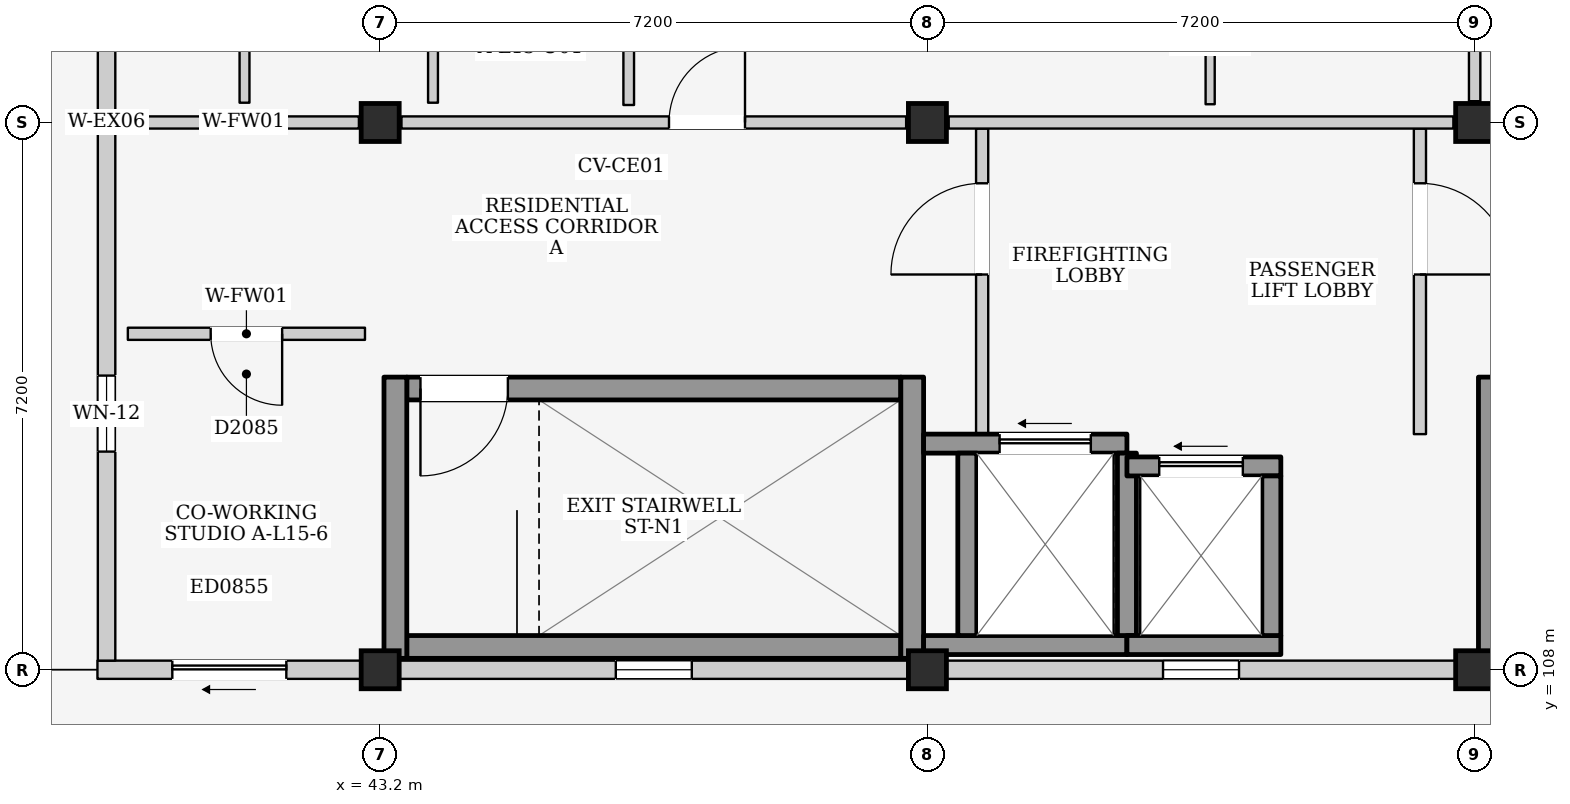
"""IFC4 building model, lengths in metres.
Left out: names, types, materials, properties, quantities, classifications, styles, units other than length and angle.
Written with IfcOpenShell. Run it as: python <this file> out.ifc"""

import sys

from ifc_helpers import new_model, si_unit, direction, frame, frame_2d, origin, origin_2d, place, context, subcontext, project, spatial, rectangle, extrude, element, fill, save


model = new_model("IFC4")
c1 = context("Model", 3, precision=1e-05, world=origin(), true_north=direction((0.0, 1.0)))
c2 = subcontext(c1, "Body", "Model", "MODEL_VIEW")
j1 = project(units=[si_unit("LENGTHUNIT", "METRE"), si_unit("PLANEANGLEUNIT", "RADIAN")], contexts=[c1])
p1 = place(None, origin())
s1 = spatial("IfcSite", under=j1, at=p1, CompositionType="ELEMENT")
p2 = place(p1, origin())
s2 = spatial("IfcBuilding", under=s1, at=p2, CompositionType="ELEMENT")
p3 = place(p2, frame((0.0, 0.0, 50.9)))
s3 = spatial("IfcBuildingStorey", under=s2, at=p3, CompositionType="ELEMENT", Elevation=50.9)
for number, where, z_axis, x_axis in (
    (1, (43.2, 108.0, 0.0), (0.0, 0.0, 1.0), (1.0, 0.0, 0.0)),
    (2, (43.2, 115.2, 0.0), (0.0, 0.0, 1.0), (1.0, 0.0, 0.0)),
    (3, (50.4, 108.0, 0.0), (0.0, 0.0, 1.0), (1.0, 0.0, 0.0)),
    (4, (50.4, 115.2, 0.0), (0.0, 0.0, 1.0), (1.0, 0.0, 0.0)),
    (5, (57.6, 108.0, 0.0), (0.0, 0.0, 1.0), (1.0, 0.0, 0.0)),
    (6, (57.6, 115.2, 0.0), (0.0, 0.0, 1.0), (1.0, 0.0, 0.0)),
):
    element("IfcColumn", number, at=place(p3, frame(where, z_axis=z_axis, x_axis=x_axis)), inside=s3, PredefinedType="COLUMN", context=c2, shape_type="SweptSolid", body=[
        extrude(rectangle(XDim=0.5, YDim=0.5, at=origin_2d()), origin(), (0.0, 0.0, 1.0), 3.2),
    ])
p4 = place(p3, frame((39.48, 108.0, 0.0), z_axis=(0.0, 0.0, 1.0), x_axis=(1.0, 0.0, 0.0)))
e7 = element("IfcWall", 7, at=p4, inside=s3, PredefinedType="ELEMENTEDWALL", context=c2, shape_type="SweptSolid", body=[
    extrude(rectangle(XDim=3.47, YDim=0.24, at=frame_2d((1.735, 0.0))), origin(), (0.0, 0.0, 1.0), 2.295),
])
p5 = place(p4, frame((0.985, 0.0, 0.0)))
e8 = element("IfcOpeningElement", 8, at=p5, cuts=e7, PredefinedType="OPENING", context=c2, shape_type="SweptSolid", body=[
    extrude(rectangle(XDim=1.5, YDim=2.12, at=frame_2d((0.75, 1.06))), frame((0.0, 0.135, 0.0), z_axis=(0.0, -1.0, 0.0), x_axis=(1.0, 0.0, 0.0)), (0.0, 0.0, 1.0), 0.27),
])
p6 = place(p3, frame((43.45, 108.0, 0.0), z_axis=(0.0, 0.0, 1.0), x_axis=(1.0, 0.0, 0.0)))
e9 = element("IfcWall", 9, at=p6, inside=s3, PredefinedType="ELEMENTEDWALL", context=c2, shape_type="SweptSolid", body=[
    extrude(rectangle(XDim=6.7, YDim=0.24, at=frame_2d((3.35, 0.0))), origin(), (0.0, 0.0, 1.0), 2.295),
])
p7 = place(p6, frame((2.85, 0.0, 1.2)))
e10 = element("IfcOpeningElement", 10, at=p7, cuts=e9, PredefinedType="OPENING", context=c2, shape_type="SweptSolid", body=[
    extrude(rectangle(XDim=1.0, YDim=0.9, at=frame_2d((0.5, 0.45))), frame((0.0, 0.135, 0.0), z_axis=(0.0, -1.0, 0.0), x_axis=(1.0, 0.0, 0.0)), (0.0, 0.0, 1.0), 0.27),
])
p8 = place(p3, frame((50.65, 108.0, 0.0), z_axis=(0.0, 0.0, 1.0), x_axis=(1.0, 0.0, 0.0)))
e11 = element("IfcWall", 11, at=p8, inside=s3, PredefinedType="ELEMENTEDWALL", context=c2, shape_type="SweptSolid", body=[
    extrude(rectangle(XDim=6.7, YDim=0.24, at=frame_2d((3.35, 0.0))), origin(), (0.0, 0.0, 1.0), 2.295),
])
p9 = place(p8, frame((2.85, 0.0, 1.2)))
e12 = element("IfcOpeningElement", 12, at=p9, cuts=e11, PredefinedType="OPENING", context=c2, shape_type="SweptSolid", body=[
    extrude(rectangle(XDim=1.0, YDim=0.9, at=frame_2d((0.5, 0.45))), frame((0.0, 0.135, 0.0), z_axis=(0.0, -1.0, 0.0), x_axis=(1.0, 0.0, 0.0)), (0.0, 0.0, 1.0), 0.27),
])
p10 = place(p3, frame((39.6, 108.12, 0.0), z_axis=(0.0, 0.0, 1.0), x_axis=(0.0, 1.0, 0.0)))
e13 = element("IfcWall", 13, at=p10, inside=s3, PredefinedType="ELEMENTEDWALL", context=c2, shape_type="SweptSolid", body=[
    extrude(rectangle(XDim=7.08, YDim=0.23, at=frame_2d((3.54, 0.0))), origin(), (0.0, 0.0, 1.0), 2.395),
])
p11 = place(p10, frame((2.75, 0.0, 1.1)))
e14 = element("IfcOpeningElement", 14, at=p11, cuts=e13, PredefinedType="OPENING", context=c2, shape_type="SweptSolid", body=[
    extrude(rectangle(XDim=1.0, YDim=0.9, at=frame_2d((0.5, 0.45))), frame((0.0, 0.13, 0.0), z_axis=(0.0, -1.0, 0.0), x_axis=(1.0, 0.0, 0.0)), (0.0, 0.0, 1.0), 0.26),
])
p12 = place(p3, frame((39.6, 115.2, 0.0), z_axis=(0.0, 0.0, 1.0), x_axis=(0.0, 1.0, 0.0)))
e15 = element("IfcWall", 15, at=p12, inside=s3, PredefinedType="ELEMENTEDWALL", context=c2, shape_type="SweptSolid", body=[
    extrude(rectangle(XDim=7.08, YDim=0.23, at=frame_2d((3.54, 0.0))), origin(), (0.0, 0.0, 1.0), 2.395),
])
p13 = place(p12, frame((3.6, 0.0, 0.0)))
e16 = element("IfcOpeningElement", 16, at=p13, cuts=e15, PredefinedType="OPENING", context=c2, shape_type="SweptSolid", body=[
    extrude(rectangle(XDim=1.08, YDim=2.12, at=frame_2d((0.54, 1.06))), frame((0.0, 0.13, 0.0), z_axis=(0.0, -1.0, 0.0), x_axis=(1.0, 0.0, 0.0)), (0.0, 0.0, 1.0), 0.26),
])
p14 = place(p3, frame((43.55, 108.3, 0.0), z_axis=(0.0, 0.0, 1.0), x_axis=(1.0, 0.0, 0.0)))
e17 = element("IfcWall", 17, at=p14, inside=s3, PredefinedType="SHEAR", context=c2, shape_type="SweptSolid", body=[
    extrude(rectangle(XDim=6.5, YDim=0.3, at=frame_2d((3.25, 0.0))), origin(), (0.0, 0.0, 1.0), 2.96),
])
p15 = place(p3, frame((43.55, 111.7, 0.0), z_axis=(0.0, 0.0, 1.0), x_axis=(1.0, 0.0, 0.0)))
e18 = element("IfcWall", 18, at=p15, inside=s3, PredefinedType="SHEAR", context=c2, shape_type="SweptSolid", body=[
    extrude(rectangle(XDim=6.5, YDim=0.3, at=frame_2d((3.25, 0.0))), origin(), (0.0, 0.0, 1.0), 2.96),
])
p16 = place(p15, frame((0.18, 0.0, 0.0)))
e19 = element("IfcOpeningElement", 19, at=p16, cuts=e18, PredefinedType="OPENING", context=c2, shape_type="SweptSolid", body=[
    extrude(rectangle(XDim=1.15, YDim=2.2, at=frame_2d((0.575, 1.1))), frame((0.0, 0.165, 0.0), z_axis=(0.0, -1.0, 0.0), x_axis=(1.0, 0.0, 0.0)), (0.0, 0.0, 1.0), 0.33),
])
for number, where, z_axis, x_axis in (
    (20, (43.4, 108.15, 0.0), (0.0, 0.0, 1.0), (0.0, 1.0, 0.0)),
    (21, (50.2, 108.15, 0.0), (0.0, 0.0, 1.0), (0.0, 1.0, 0.0)),
):
    element("IfcWall", number, at=place(p3, frame(where, z_axis=z_axis, x_axis=x_axis)), inside=s3, PredefinedType="SHEAR", context=c2, shape_type="SweptSolid", body=[
        extrude(rectangle(XDim=3.7, YDim=0.3, at=frame_2d((1.85, 0.0))), origin(), (0.0, 0.0, 1.0), 2.96),
    ])
p17 = place(p3, frame((51.12, 111.1, 0.0), z_axis=(0.0, 0.0, 1.0), x_axis=(0.0, 1.0, 0.0)))
e22 = element("IfcWall", 22, at=p17, inside=s3, PredefinedType="PARTITIONING", context=c2, shape_type="SweptSolid", body=[
    extrude(rectangle(XDim=4.02, YDim=0.16, at=frame_2d((2.01, 0.0))), origin(), (0.0, 0.0, 1.0), 2.96),
])
p18 = place(p17, frame((2.1, 0.0, 0.0)))
e23 = element("IfcOpeningElement", 23, at=p18, cuts=e22, PredefinedType="OPENING", context=c2, shape_type="SweptSolid", body=[
    extrude(rectangle(XDim=1.2, YDim=2.2, at=frame_2d((0.6, 1.1))), frame((0.0, 0.095, 0.0), z_axis=(0.0, -1.0, 0.0), x_axis=(1.0, 0.0, 0.0)), (0.0, 0.0, 1.0), 0.19),
])
p19 = place(p3, frame((56.88, 111.1, 0.0), z_axis=(0.0, 0.0, 1.0), x_axis=(0.0, 1.0, 0.0)))
e24 = element("IfcWall", 24, at=p19, inside=s3, PredefinedType="PARTITIONING", context=c2, shape_type="SweptSolid", body=[
    extrude(rectangle(XDim=4.02, YDim=0.16, at=frame_2d((2.01, 0.0))), origin(), (0.0, 0.0, 1.0), 2.96),
])
p20 = place(p19, frame((2.1, 0.0, 0.0)))
e25 = element("IfcOpeningElement", 25, at=p20, cuts=e24, PredefinedType="OPENING", context=c2, shape_type="SweptSolid", body=[
    extrude(rectangle(XDim=1.2, YDim=2.2, at=frame_2d((0.6, 1.1))), frame((0.0, 0.095, 0.0), z_axis=(0.0, -1.0, 0.0), x_axis=(1.0, 0.0, 0.0)), (0.0, 0.0, 1.0), 0.19),
])
p21 = place(p3, frame((50.35, 108.325, 0.0), z_axis=(0.0, 0.0, 1.0), x_axis=(1.0, 0.0, 0.0)))
e26 = element("IfcWall", 26, at=p21, inside=s3, PredefinedType="SHEAR", context=c2, shape_type="SweptSolid", body=[
    extrude(rectangle(XDim=2.675, YDim=0.25, at=frame_2d((1.337, 0.0))), origin(), (0.0, 0.0, 1.0), 2.96),
])
p22 = place(p3, frame((50.35, 110.975, 0.0), z_axis=(0.0, 0.0, 1.0), x_axis=(1.0, 0.0, 0.0)))
e27 = element("IfcWall", 27, at=p22, inside=s3, PredefinedType="SHEAR", context=c2, shape_type="SweptSolid", body=[
    extrude(rectangle(XDim=2.675, YDim=0.25, at=frame_2d((1.337, 0.0))), origin(), (0.0, 0.0, 1.0), 2.96),
])
p23 = place(p22, frame((1.0, 0.0, 0.0)))
e28 = element("IfcOpeningElement", 28, at=p23, cuts=e27, PredefinedType="OPENING", context=c2, shape_type="SweptSolid", body=[
    extrude(rectangle(XDim=1.2, YDim=2.25, at=frame_2d((0.6, 1.125))), frame((0.0, 0.14, 0.0), z_axis=(0.0, -1.0, 0.0), x_axis=(1.0, 0.0, 0.0)), (0.0, 0.0, 1.0), 0.28),
])
for number, where, z_axis, x_axis in (
    (29, (50.925, 108.45, 0.0), (0.0, 0.0, 1.0), (0.0, 1.0, 0.0)),
    (30, (53.025, 108.45, 0.0), (0.0, 0.0, 1.0), (0.0, 1.0, 0.0)),
):
    element("IfcWall", number, at=place(p3, frame(where, z_axis=z_axis, x_axis=x_axis)), inside=s3, PredefinedType="SHEAR", context=c2, shape_type="SweptSolid", body=[
        extrude(rectangle(XDim=2.4, YDim=0.25, at=frame_2d((1.2, 0.0))), origin(), (0.0, 0.0, 1.0), 2.96),
    ])
p24 = place(p3, frame((53.025, 108.325, 0.0), z_axis=(0.0, 0.0, 1.0), x_axis=(1.0, 0.0, 0.0)))
e31 = element("IfcWall", 31, at=p24, inside=s3, PredefinedType="SHEAR", context=c2, shape_type="SweptSolid", body=[
    extrude(rectangle(XDim=2.025, YDim=0.25, at=frame_2d((1.013, 0.0))), origin(), (0.0, 0.0, 1.0), 2.96),
])
p25 = place(p3, frame((53.025, 110.675, 0.0), z_axis=(0.0, 0.0, 1.0), x_axis=(1.0, 0.0, 0.0)))
e32 = element("IfcWall", 32, at=p25, inside=s3, PredefinedType="SHEAR", context=c2, shape_type="SweptSolid", body=[
    extrude(rectangle(XDim=2.025, YDim=0.25, at=frame_2d((1.013, 0.0))), origin(), (0.0, 0.0, 1.0), 2.96),
])
p26 = place(p25, frame((0.425, 0.0, 0.0)))
e33 = element("IfcOpeningElement", 33, at=p26, cuts=e32, PredefinedType="OPENING", context=c2, shape_type="SweptSolid", body=[
    extrude(rectangle(XDim=1.1, YDim=2.15, at=frame_2d((0.55, 1.075))), frame((0.0, 0.14, 0.0), z_axis=(0.0, -1.0, 0.0), x_axis=(1.0, 0.0, 0.0)), (0.0, 0.0, 1.0), 0.28),
])
p27 = place(p3, frame((54.925, 108.45, 0.0), z_axis=(0.0, 0.0, 1.0), x_axis=(0.0, 1.0, 0.0)))
e34 = element("IfcWall", 34, at=p27, inside=s3, PredefinedType="SHEAR", context=c2, shape_type="SweptSolid", body=[
    extrude(rectangle(XDim=2.1, YDim=0.25, at=frame_2d((1.05, 0.0))), origin(), (0.0, 0.0, 1.0), 2.96),
])
p28 = place(p3, frame((57.8, 108.15, 0.0), z_axis=(0.0, 0.0, 1.0), x_axis=(0.0, 1.0, 0.0)))
e35 = element("IfcWall", 35, at=p28, inside=s3, PredefinedType="SHEAR", context=c2, shape_type="SweptSolid", body=[
    extrude(rectangle(XDim=3.7, YDim=0.3, at=frame_2d((1.85, 0.0))), origin(), (0.0, 0.0, 1.0), 2.96),
])
p29 = place(p3, frame((39.88, 115.2, 0.0), z_axis=(0.0, 0.0, 1.0), x_axis=(1.0, 0.0, 0.0)))
e36 = element("IfcWall", 36, at=p29, inside=s3, PredefinedType="PARTITIONING", context=c2, shape_type="SweptSolid", body=[
    extrude(rectangle(XDim=3.04, YDim=0.16, at=frame_2d((1.52, 0.0))), origin(), (0.0, 0.0, 1.0), 2.295),
])
p30 = place(p3, frame((43.48, 115.2, 0.0), z_axis=(0.0, 0.0, 1.0), x_axis=(1.0, 0.0, 0.0)))
e37 = element("IfcWall", 37, at=p30, inside=s3, PredefinedType="PARTITIONING", context=c2, shape_type="SweptSolid", body=[
    extrude(rectangle(XDim=6.64, YDim=0.16, at=frame_2d((3.32, 0.0))), origin(), (0.0, 0.0, 1.0), 2.295),
])
p31 = place(p30, frame((3.52, 0.0, 0.0)))
e38 = element("IfcOpeningElement", 38, at=p31, cuts=e37, PredefinedType="OPENING", context=c2, shape_type="SweptSolid", body=[
    extrude(rectangle(XDim=1.0, YDim=2.15, at=frame_2d((0.5, 1.075))), frame((0.0, 0.095, 0.0), z_axis=(0.0, -1.0, 0.0), x_axis=(1.0, 0.0, 0.0)), (0.0, 0.0, 1.0), 0.19),
])
p32 = place(p3, frame((50.68, 115.2, 0.0), z_axis=(0.0, 0.0, 1.0), x_axis=(1.0, 0.0, 0.0)))
e39 = element("IfcWall", 39, at=p32, inside=s3, PredefinedType="PARTITIONING", context=c2, shape_type="SweptSolid", body=[
    extrude(rectangle(XDim=6.64, YDim=0.16, at=frame_2d((3.32, 0.0))), origin(), (0.0, 0.0, 1.0), 2.295),
])
p33 = place(p3, frame((57.6, 115.48, 0.0), z_axis=(0.0, 0.0, 1.0), x_axis=(0.0, 1.0, 0.0)))
e40 = element("IfcWall", 40, at=p33, inside=s3, PredefinedType="PARTITIONING", context=c2, shape_type="SweptSolid", body=[
    extrude(rectangle(XDim=6.64, YDim=0.15, at=frame_2d((3.32, 0.0))), origin(), (0.0, 0.0, 1.0), 2.445),
])
for number, where, z_axis, x_axis in (
    (41, (43.895, 115.46, 0.0), (0.0, 0.0, 1.0), (0.0, 1.0, 0.0)),
    (42, (41.415, 115.46, 0.0), (0.0, 0.0, 1.0), (0.0, 1.0, 0.0)),
):
    element("IfcWall", number, at=place(p3, frame(where, z_axis=z_axis, x_axis=x_axis)), inside=s3, PredefinedType="PARTITIONING", context=c2, shape_type="SweptSolid", body=[
        extrude(rectangle(XDim=3.04, YDim=0.13, at=frame_2d((1.52, 0.0))), origin(), (0.0, 0.0, 1.0), 2.96),
    ])
p34 = place(p3, frame((46.47, 115.43, 0.0), z_axis=(0.0, 0.0, 1.0), x_axis=(0.0, 1.0, 0.0)))
e43 = element("IfcWall", 43, at=p34, inside=s3, PredefinedType="PARTITIONING", context=c2, shape_type="SweptSolid", body=[
    extrude(rectangle(XDim=3.06, YDim=0.14, at=frame_2d((1.53, 0.0))), origin(), (0.0, 0.0, 1.0), 2.96),
])
p35 = place(p3, frame((54.12, 115.44, 0.0), z_axis=(0.0, 0.0, 1.0), x_axis=(0.0, 1.0, 0.0)))
e44 = element("IfcWall", 44, at=p35, inside=s3, PredefinedType="PARTITIONING", context=c2, shape_type="SweptSolid", body=[
    extrude(rectangle(XDim=3.04, YDim=0.12, at=frame_2d((1.52, 0.0))), origin(), (0.0, 0.0, 1.0), 2.96),
])
p36 = place(p35, frame((1.04, 0.0, 0.0)))
e45 = element("IfcOpeningElement", 45, at=p36, cuts=e44, PredefinedType="OPENING", context=c2, shape_type="SweptSolid", body=[
    extrude(rectangle(XDim=0.96, YDim=2.15, at=frame_2d((0.48, 1.075))), frame((0.0, 0.075, 0.0), z_axis=(0.0, -1.0, 0.0), x_axis=(1.0, 0.0, 0.0)), (0.0, 0.0, 1.0), 0.15),
])
p37 = place(p3, frame((39.88, 112.42, 0.0), z_axis=(0.0, 0.0, 1.0), x_axis=(1.0, 0.0, 0.0)))
e46 = element("IfcWall", 46, at=p37, inside=s3, PredefinedType="PARTITIONING", context=c2, shape_type="SweptSolid", body=[
    extrude(rectangle(XDim=3.12, YDim=0.16, at=frame_2d((1.56, 0.0))), origin(), (0.0, 0.0, 1.0), 2.96),
])
p38 = place(p37, frame((1.09, 0.0, 0.0)))
e47 = element("IfcOpeningElement", 47, at=p38, cuts=e46, PredefinedType="OPENING", context=c2, shape_type="SweptSolid", body=[
    extrude(rectangle(XDim=0.94, YDim=2.12, at=frame_2d((0.47, 1.06))), frame((0.0, 0.095, 0.0), z_axis=(0.0, -1.0, 0.0), x_axis=(1.0, 0.0, 0.0)), (0.0, 0.0, 1.0), 0.19),
])
p39 = place(p5, frame((1.5, 0.0, 0.0), z_axis=(0.0, 0.0, 1.0), x_axis=(-1.0, 0.0, 0.0)))
e48 = element("IfcDoor", 48, at=p39, inside=s3, OperationType="SLIDING_TO_LEFT", PredefinedType="DOOR", context=c2, shape_type="SweptSolid", body=[
    extrude(rectangle(XDim=1.5, YDim=2.12, at=frame_2d((0.75, 1.06))), frame((0.0, 0.025, 0.0), z_axis=(0.0, -1.0, 0.0), x_axis=(1.0, 0.0, 0.0)), (0.0, 0.0, 1.0), 0.05),
])
fill(e8, e48)
p40 = place(p7, origin())
e49 = element("IfcWindow", 49, at=p40, inside=s3, PartitioningType="SINGLE_PANEL", PredefinedType="WINDOW", context=c2, shape_type="SweptSolid", body=[
    extrude(rectangle(XDim=1.0, YDim=0.9, at=frame_2d((0.5, 0.45))), frame((0.0, 0.03, 0.0), z_axis=(0.0, -1.0, 0.0), x_axis=(1.0, 0.0, 0.0)), (0.0, 0.0, 1.0), 0.06),
])
fill(e10, e49)
p41 = place(p9, origin())
e50 = element("IfcWindow", 50, at=p41, inside=s3, PartitioningType="SINGLE_PANEL", PredefinedType="WINDOW", context=c2, shape_type="SweptSolid", body=[
    extrude(rectangle(XDim=1.0, YDim=0.9, at=frame_2d((0.5, 0.45))), frame((0.0, 0.03, 0.0), z_axis=(0.0, -1.0, 0.0), x_axis=(1.0, 0.0, 0.0)), (0.0, 0.0, 1.0), 0.06),
])
fill(e12, e50)
p42 = place(p11, origin())
e51 = element("IfcWindow", 51, at=p42, inside=s3, PartitioningType="SINGLE_PANEL", PredefinedType="WINDOW", context=c2, shape_type="SweptSolid", body=[
    extrude(rectangle(XDim=1.0, YDim=0.9, at=frame_2d((0.5, 0.45))), frame((0.0, 0.03, 0.0), z_axis=(0.0, -1.0, 0.0), x_axis=(1.0, 0.0, 0.0)), (0.0, 0.0, 1.0), 0.06),
])
fill(e14, e51)
p43 = place(p16, frame((1.15, 0.0, 0.0), z_axis=(0.0, 0.0, 1.0), x_axis=(-1.0, 0.0, 0.0)))
e52 = element("IfcDoor", 52, at=p43, inside=s3, OperationType="SINGLE_SWING_RIGHT", PredefinedType="DOOR", context=c2, shape_type="SweptSolid", body=[
    extrude(rectangle(XDim=1.15, YDim=2.2, at=frame_2d((0.575, 1.1))), frame((0.0, 0.025, 0.0), z_axis=(0.0, -1.0, 0.0), x_axis=(1.0, 0.0, 0.0)), (0.0, 0.0, 1.0), 0.05),
])
fill(e19, e52)
p44 = place(p18, origin())
e53 = element("IfcDoor", 53, at=p44, inside=s3, OperationType="SINGLE_SWING_LEFT", PredefinedType="DOOR", context=c2, shape_type="SweptSolid", body=[
    extrude(rectangle(XDim=1.2, YDim=2.2, at=frame_2d((0.6, 1.1))), frame((0.0, 0.025, 0.0), z_axis=(0.0, -1.0, 0.0), x_axis=(1.0, 0.0, 0.0)), (0.0, 0.0, 1.0), 0.05),
])
fill(e23, e53)
p45 = place(p20, frame((1.2, 0.0, 0.0), z_axis=(0.0, 0.0, 1.0), x_axis=(-1.0, 0.0, 0.0)))
e54 = element("IfcDoor", 54, at=p45, inside=s3, OperationType="SINGLE_SWING_RIGHT", PredefinedType="DOOR", context=c2, shape_type="SweptSolid", body=[
    extrude(rectangle(XDim=1.2, YDim=2.2, at=frame_2d((0.6, 1.1))), frame((0.0, 0.025, 0.0), z_axis=(0.0, -1.0, 0.0), x_axis=(1.0, 0.0, 0.0)), (0.0, 0.0, 1.0), 0.05),
])
fill(e25, e54)
p46 = place(p23, origin())
e55 = element("IfcDoor", 55, at=p46, inside=s3, OperationType="SLIDING_TO_LEFT", PredefinedType="DOOR", context=c2, shape_type="SweptSolid", body=[
    extrude(rectangle(XDim=1.2, YDim=2.25, at=frame_2d((0.6, 1.125))), frame((0.0, 0.025, 0.0), z_axis=(0.0, -1.0, 0.0), x_axis=(1.0, 0.0, 0.0)), (0.0, 0.0, 1.0), 0.05),
])
fill(e28, e55)
p47 = place(p26, origin())
e56 = element("IfcDoor", 56, at=p47, inside=s3, OperationType="SLIDING_TO_LEFT", PredefinedType="DOOR", context=c2, shape_type="SweptSolid", body=[
    extrude(rectangle(XDim=1.1, YDim=2.15, at=frame_2d((0.55, 1.075))), frame((0.0, 0.025, 0.0), z_axis=(0.0, -1.0, 0.0), x_axis=(1.0, 0.0, 0.0)), (0.0, 0.0, 1.0), 0.05),
])
fill(e33, e56)
p48 = place(p31, origin())
e57 = element("IfcDoor", 57, at=p48, inside=s3, OperationType="SINGLE_SWING_RIGHT", PredefinedType="DOOR", context=c2, shape_type="SweptSolid", body=[
    extrude(rectangle(XDim=1.0, YDim=2.15, at=frame_2d((0.5, 1.075))), frame((0.0, 0.025, 0.0), z_axis=(0.0, -1.0, 0.0), x_axis=(1.0, 0.0, 0.0)), (0.0, 0.0, 1.0), 0.05),
])
fill(e38, e57)
p49 = place(p38, frame((0.94, 0.0, 0.0), z_axis=(0.0, 0.0, 1.0), x_axis=(-1.0, 0.0, 0.0)))
e58 = element("IfcDoor", 58, at=p49, inside=s3, OperationType="SINGLE_SWING_LEFT", PredefinedType="DOOR", context=c2, shape_type="SweptSolid", body=[
    extrude(rectangle(XDim=0.94, YDim=2.12, at=frame_2d((0.47, 1.06))), frame((0.0, 0.025, 0.0), z_axis=(0.0, -1.0, 0.0), x_axis=(1.0, 0.0, 0.0)), (0.0, 0.0, 1.0), 0.05),
])
fill(e47, e58)
save(model, sys.argv[1])
